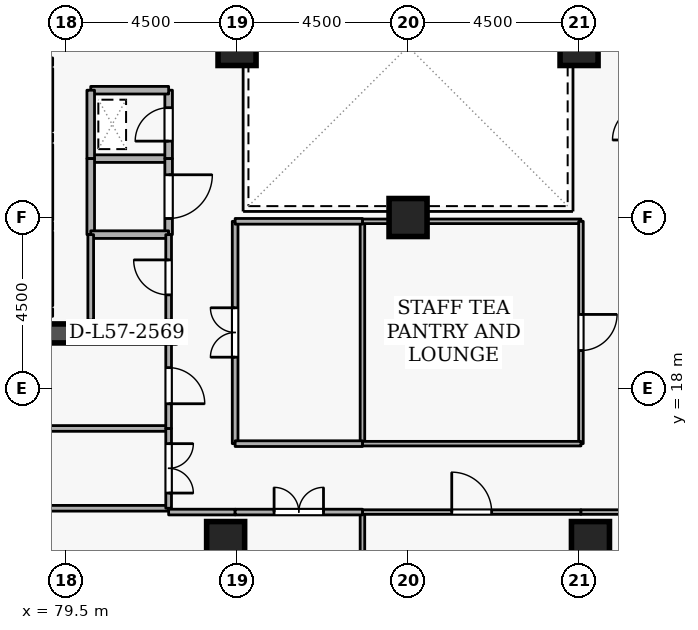
"""IFC4 building model, lengths in metres.
Left out: names, types, materials, properties, quantities, classifications, styles, units other than length and angle.
Written with IfcOpenShell. Run it as: python <this file> out.ifc"""

import sys

from ifc_helpers import new_model, si_unit, direction, frame, frame_2d, origin, origin_2d, place, context, subcontext, project, spatial, rectangle, extrude, element, fill, save


model = new_model("IFC4")
c1 = context("Model", 3, precision=1e-05, world=origin(), true_north=direction((0.0, 1.0)))
c2 = subcontext(c1, "Body", "Model", "MODEL_VIEW")
j1 = project(units=[si_unit("LENGTHUNIT", "METRE"), si_unit("PLANEANGLEUNIT", "RADIAN")], contexts=[c1])
p1 = place(None, origin())
s1 = spatial("IfcSite", under=j1, at=p1, CompositionType="ELEMENT")
p2 = place(p1, origin())
s2 = spatial("IfcBuilding", under=s1, at=p2, CompositionType="ELEMENT")
p3 = place(p2, frame((0.0, 0.0, 214.5)))
s3 = spatial("IfcBuildingStorey", under=s2, at=p3, CompositionType="ELEMENT", Elevation=214.5)
p4 = place(p3, frame((76.6, 19.45, 0.0), z_axis=(0.0, 0.0, 1.0), x_axis=(1.0, 0.0, 0.0)))
e1 = element("IfcWall", 1, at=p4, inside=s3, PredefinedType="SHEAR", context=c2, shape_type="SweptSolid", body=[
    extrude(rectangle(XDim=5.8, YDim=0.5, at=frame_2d((2.9, 0.0))), origin(), (0.0, 0.0, 1.0), 3.6),
])
for number, where, z_axis, x_axis in (
    (2, (93.3, 14.0, 0.0), (0.0, 0.0, 1.0), (1.0, 0.0, 0.0)),
    (3, (83.7, 14.0, 0.0), (0.0, 0.0, 1.0), (1.0, 0.0, 0.0)),
    (4, (93.0, 27.0, 0.0), (0.0, 0.0, 1.0), (1.0, 0.0, 0.0)),
    (5, (84.0, 27.0, 0.0), (0.0, 0.0, 1.0), (1.0, 0.0, 0.0)),
    (6, (88.5, 22.5, 0.0), (0.0, 0.0, 1.0), (1.0, 0.0, 0.0)),
):
    element("IfcColumn", number, at=place(p3, frame(where, z_axis=z_axis, x_axis=x_axis)), inside=s3, PredefinedType="COLUMN", context=c2, shape_type="SweptSolid", body=[
        extrude(rectangle(XDim=1.0, YDim=1.0, at=origin_2d()), origin(), (0.0, 0.0, 1.0), 3.6),
    ])
p5 = place(p3, frame((79.05, 24.78, 0.0), z_axis=(0.0, 0.0, 1.0), x_axis=(0.0, 1.0, 0.0)))
e7 = element("IfcWall", 7, at=p5, inside=s3, PredefinedType="STANDARD", context=c2, shape_type="SweptSolid", body=[
    extrude(rectangle(XDim=1.64, YDim=0.2, at=frame_2d((0.82, 0.0))), origin(), (0.0, 0.0, 1.0), 3.34),
])
p6 = place(p5, frame((0.31, 0.0, 0.0)))
e8 = element("IfcOpeningElement", 8, at=p6, cuts=e7, PredefinedType="OPENING", context=c2, shape_type="SweptSolid", body=[
    extrude(rectangle(XDim=1.02, YDim=2.06, at=frame_2d((0.51, 1.03))), frame((0.0, 0.11, 0.0), z_axis=(0.0, -1.0, 0.0), x_axis=(1.0, 0.0, 0.0)), (0.0, 0.0, 1.0), 0.22),
])
p7 = place(p3, frame((79.05, 22.43, 0.0), z_axis=(0.0, 0.0, 1.0), x_axis=(0.0, 1.0, 0.0)))
e9 = element("IfcWall", 9, at=p7, inside=s3, PredefinedType="STANDARD", context=c2, shape_type="SweptSolid", body=[
    extrude(rectangle(XDim=1.99, YDim=0.2, at=frame_2d((0.995, 0.0))), origin(), (0.0, 0.0, 1.0), 3.34),
])
p8 = place(p7, frame((0.485, 0.0, 0.0)))
e10 = element("IfcOpeningElement", 10, at=p8, cuts=e9, PredefinedType="OPENING", context=c2, shape_type="SweptSolid", body=[
    extrude(rectangle(XDim=1.02, YDim=2.06, at=frame_2d((0.51, 1.03))), frame((0.0, 0.11, 0.0), z_axis=(0.0, -1.0, 0.0), x_axis=(1.0, 0.0, 0.0)), (0.0, 0.0, 1.0), 0.22),
])
p9 = place(p3, frame((79.05, 20.18, 0.0), z_axis=(0.0, 0.0, 1.0), x_axis=(0.0, 1.0, 0.0)))
e11 = element("IfcWall", 11, at=p9, inside=s3, PredefinedType="STANDARD", context=c2, shape_type="SweptSolid", body=[
    extrude(rectangle(XDim=1.94, YDim=0.2, at=frame_2d((0.97, 0.0))), origin(), (0.0, 0.0, 1.0), 3.34),
])
p10 = place(p9, frame((0.46, 0.0, 0.0)))
e12 = element("IfcOpeningElement", 12, at=p10, cuts=e11, PredefinedType="OPENING", context=c2, shape_type="SweptSolid", body=[
    extrude(rectangle(XDim=1.02, YDim=2.06, at=frame_2d((0.51, 1.03))), frame((0.0, 0.11, 0.0), z_axis=(0.0, -1.0, 0.0), x_axis=(1.0, 0.0, 0.0)), (0.0, 0.0, 1.0), 0.22),
])
p11 = place(p3, frame((80.15, 24.05, 0.0), z_axis=(0.0, 0.0, 1.0), x_axis=(1.0, 0.0, 0.0)))
e13 = element("IfcWall", 13, at=p11, inside=s3, PredefinedType="STANDARD", context=c2, shape_type="SweptSolid", body=[
    extrude(rectangle(XDim=2.05, YDim=0.2, at=frame_2d((1.025, 0.0))), origin(), (0.0, 0.0, 1.0), 3.34),
])
p12 = place(p3, frame((82.2, 24.05, 0.0), z_axis=(0.0, 0.0, 1.0), x_axis=(0.0, 1.0, 0.0)))
e14 = element("IfcWall", 14, at=p12, inside=s3, PredefinedType="STANDARD", context=c2, shape_type="SweptSolid", body=[
    extrude(rectangle(XDim=1.8, YDim=0.2, at=frame_2d((0.9, 0.0))), origin(), (0.0, 0.0, 1.0), 3.34),
])
p13 = place(p12, frame((0.46, 0.0, 0.0)))
e15 = element("IfcOpeningElement", 15, at=p13, cuts=e14, PredefinedType="OPENING", context=c2, shape_type="SweptSolid", body=[
    extrude(rectangle(XDim=0.88, YDim=2.04, at=frame_2d((0.44, 1.02))), frame((0.0, 0.11, 0.0), z_axis=(0.0, -1.0, 0.0), x_axis=(1.0, 0.0, 0.0)), (0.0, 0.0, 1.0), 0.22),
])
p14 = place(p3, frame((82.2, 25.85, 0.0), z_axis=(0.0, 0.0, 1.0), x_axis=(-1.0, 0.0, 0.0)))
e16 = element("IfcWall", 16, at=p14, inside=s3, PredefinedType="STANDARD", context=c2, shape_type="SweptSolid", body=[
    extrude(rectangle(XDim=2.05, YDim=0.2, at=frame_2d((1.025, 0.0))), origin(), (0.0, 0.0, 1.0), 3.34),
])
p15 = place(p3, frame((80.15, 25.85, 0.0), z_axis=(0.0, 0.0, 1.0), x_axis=(0.0, -1.0, 0.0)))
e17 = element("IfcWall", 17, at=p15, inside=s3, PredefinedType="STANDARD", context=c2, shape_type="SweptSolid", body=[
    extrude(rectangle(XDim=1.8, YDim=0.2, at=frame_2d((0.9, 0.0))), origin(), (0.0, 0.0, 1.0), 3.34),
])
p16 = place(p3, frame((80.15, 22.05, 0.0), z_axis=(0.0, 0.0, 1.0), x_axis=(0.0, 1.0, 0.0)))
e18 = element("IfcWall", 18, at=p16, inside=s3, PredefinedType="STANDARD", context=c2, shape_type="SweptSolid", body=[
    extrude(rectangle(XDim=2.0, YDim=0.2, at=frame_2d((1.0, 0.0))), origin(), (0.0, 0.0, 1.0), 3.34),
])
p17 = place(p3, frame((82.2, 24.05, 0.0), z_axis=(0.0, 0.0, 1.0), x_axis=(0.0, -1.0, 0.0)))
e19 = element("IfcWall", 19, at=p17, inside=s3, PredefinedType="STANDARD", context=c2, shape_type="SweptSolid", body=[
    extrude(rectangle(XDim=2.0, YDim=0.2, at=frame_2d((1.0, 0.0))), origin(), (0.0, 0.0, 1.0), 3.34),
])
p18 = place(p17, frame((0.425, 0.0, 0.0)))
e20 = element("IfcOpeningElement", 20, at=p18, cuts=e19, PredefinedType="OPENING", context=c2, shape_type="SweptSolid", body=[
    extrude(rectangle(XDim=1.15, YDim=2.1, at=frame_2d((0.575, 1.05))), frame((0.0, 0.11, 0.0), z_axis=(0.0, -1.0, 0.0), x_axis=(1.0, 0.0, 0.0)), (0.0, 0.0, 1.0), 0.22),
])
p19 = place(p3, frame((82.2, 22.05, 0.0), z_axis=(0.0, 0.0, 1.0), x_axis=(-1.0, 0.0, 0.0)))
e21 = element("IfcWall", 21, at=p19, inside=s3, PredefinedType="STANDARD", context=c2, shape_type="SweptSolid", body=[
    extrude(rectangle(XDim=2.05, YDim=0.2, at=frame_2d((1.025, 0.0))), origin(), (0.0, 0.0, 1.0), 3.34),
])
p20 = place(p3, frame((82.2, 19.8, 0.0), z_axis=(0.0, 0.0, 1.0), x_axis=(0.0, 1.0, 0.0)))
e22 = element("IfcWall", 22, at=p20, inside=s3, PredefinedType="PARTITIONING", context=c2, shape_type="SweptSolid", body=[
    extrude(rectangle(XDim=2.25, YDim=0.15, at=frame_2d((1.125, 0.0))), origin(), (0.0, 0.0, 1.0), 3.34),
])
p21 = place(p20, frame((0.665, 0.0, 0.0)))
e23 = element("IfcOpeningElement", 23, at=p21, cuts=e22, PredefinedType="OPENING", context=c2, shape_type="SweptSolid", body=[
    extrude(rectangle(XDim=0.92, YDim=2.08, at=frame_2d((0.46, 1.04))), frame((0.0, 0.085, 0.0), z_axis=(0.0, -1.0, 0.0), x_axis=(1.0, 0.0, 0.0)), (0.0, 0.0, 1.0), 0.17),
])
p22 = place(p3, frame((80.15, 22.05, 0.0), z_axis=(0.0, 0.0, 1.0), x_axis=(0.0, -1.0, 0.0)))
e24 = element("IfcWall", 24, at=p22, inside=s3, PredefinedType="PARTITIONING", context=c2, shape_type="SweptSolid", body=[
    extrude(rectangle(XDim=2.25, YDim=0.15, at=frame_2d((1.125, 0.0))), origin(), (0.0, 0.0, 1.0), 3.34),
])
for number, where, z_axis, x_axis in (
    (25, (82.2, 14.85, 0.0), (0.0, 0.0, 1.0), (-1.0, 0.0, 0.0)),
    (26, (64.78, 16.95, 0.0), (0.0, 0.0, 1.0), (1.0, 0.0, 0.0)),
):
    element("IfcWall", number, at=place(p3, frame(where, z_axis=z_axis, x_axis=x_axis)), inside=s3, PredefinedType="PARTITIONING", context=c2, shape_type="SweptSolid", body=[
        extrude(rectangle(XDim=17.42, YDim=0.15, at=frame_2d((8.71, 0.0))), origin(), (0.0, 0.0, 1.0), 3.34),
    ])
p23 = place(p3, frame((82.2, 16.95, 0.0), z_axis=(0.0, 0.0, 1.0), x_axis=(0.0, -1.0, 0.0)))
e27 = element("IfcWall", 27, at=p23, inside=s3, PredefinedType="PARTITIONING", context=c2, shape_type="SweptSolid", body=[
    extrude(rectangle(XDim=2.1, YDim=0.15, at=frame_2d((1.05, 0.0))), origin(), (0.0, 0.0, 1.0), 3.34),
])
p24 = place(p23, frame((0.4, 0.0, 0.0)))
e28 = element("IfcOpeningElement", 28, at=p24, cuts=e27, PredefinedType="OPENING", context=c2, shape_type="SweptSolid", body=[
    extrude(rectangle(XDim=1.3, YDim=2.12, at=frame_2d((0.65, 1.06))), frame((0.0, 0.085, 0.0), z_axis=(0.0, -1.0, 0.0), x_axis=(1.0, 0.0, 0.0)), (0.0, 0.0, 1.0), 0.17),
])
p25 = place(p3, frame((82.2, 19.2, 0.0), z_axis=(0.0, 0.0, 1.0), x_axis=(0.0, -1.0, 0.0)))
e29 = element("IfcWall", 29, at=p25, inside=s3, PredefinedType="PARTITIONING", context=c2, shape_type="SweptSolid", body=[
    extrude(rectangle(XDim=2.25, YDim=0.15, at=frame_2d((1.125, 0.0))), origin(), (0.0, 0.0, 1.0), 3.34),
])
p26 = place(p25, frame((0.65, 0.0, 0.0)))
e30 = element("IfcOpeningElement", 30, at=p26, cuts=e29, PredefinedType="OPENING", context=c2, shape_type="SweptSolid", body=[
    extrude(rectangle(XDim=0.95, YDim=2.1, at=frame_2d((0.475, 1.05))), frame((0.0, 0.085, 0.0), z_axis=(0.0, -1.0, 0.0), x_axis=(1.0, 0.0, 0.0)), (0.0, 0.0, 1.0), 0.17),
])
p27 = place(p3, frame((87.3, 3.28, 0.0), z_axis=(0.0, 0.0, 1.0), x_axis=(0.0, 1.0, 0.0)))
e31 = element("IfcWall", 31, at=p27, inside=s3, PredefinedType="PARTITIONING", context=c2, shape_type="SweptSolid", body=[
    extrude(rectangle(XDim=11.47, YDim=0.12, at=frame_2d((5.735, 0.0))), origin(), (0.0, 0.0, 1.0), 3.34),
])
p28 = place(p3, frame((87.3, 14.75, 0.0), z_axis=(0.0, 0.0, 1.0), x_axis=(1.0, 0.0, 0.0)))
e32 = element("IfcWall", 32, at=p28, inside=s3, PredefinedType="PARTITIONING", context=c2, shape_type="SweptSolid", body=[
    extrude(rectangle(XDim=5.75, YDim=0.12, at=frame_2d((2.875, 0.0))), origin(), (0.0, 0.0, 1.0), 3.34),
])
p29 = place(p28, frame((2.35, 0.0, 0.0)))
e33 = element("IfcOpeningElement", 33, at=p29, cuts=e32, PredefinedType="OPENING", context=c2, shape_type="SweptSolid", body=[
    extrude(rectangle(XDim=1.05, YDim=2.1, at=frame_2d((0.525, 1.05))), frame((0.0, 0.07, 0.0), z_axis=(0.0, -1.0, 0.0), x_axis=(1.0, 0.0, 0.0)), (0.0, 0.0, 1.0), 0.14),
])
p30 = place(p3, frame((93.05, 14.75, 0.0), z_axis=(0.0, 0.0, 1.0), x_axis=(1.0, 0.0, 0.0)))
e34 = element("IfcWall", 34, at=p30, inside=s3, PredefinedType="PARTITIONING", context=c2, shape_type="SweptSolid", body=[
    extrude(rectangle(XDim=1.75, YDim=0.12, at=frame_2d((0.875, 0.0))), origin(), (0.0, 0.0, 1.0), 3.34),
])
p31 = place(p3, frame((82.2, 14.75, 0.0), z_axis=(0.0, 0.0, 1.0), x_axis=(1.0, 0.0, 0.0)))
e35 = element("IfcWall", 35, at=p31, inside=s3, PredefinedType="PARTITIONING", context=c2, shape_type="SweptSolid", body=[
    extrude(rectangle(XDim=1.75, YDim=0.15, at=frame_2d((0.875, 0.0))), origin(), (0.0, 0.0, 1.0), 3.34),
])
p32 = place(p3, frame((83.95, 14.75, 0.0), z_axis=(0.0, 0.0, 1.0), x_axis=(1.0, 0.0, 0.0)))
e36 = element("IfcWall", 36, at=p32, inside=s3, PredefinedType="PARTITIONING", context=c2, shape_type="SweptSolid", body=[
    extrude(rectangle(XDim=3.35, YDim=0.15, at=frame_2d((1.675, 0.0))), origin(), (0.0, 0.0, 1.0), 3.34),
])
p33 = place(p32, frame((1.025, 0.0, 0.0)))
e37 = element("IfcOpeningElement", 37, at=p33, cuts=e36, PredefinedType="OPENING", context=c2, shape_type="SweptSolid", body=[
    extrude(rectangle(XDim=1.3, YDim=2.12, at=frame_2d((0.65, 1.06))), frame((0.0, 0.085, 0.0), z_axis=(0.0, -1.0, 0.0), x_axis=(1.0, 0.0, 0.0)), (0.0, 0.0, 1.0), 0.17),
])
p34 = place(p3, frame((87.3, 16.55, 0.0), z_axis=(0.0, 0.0, 1.0), x_axis=(0.0, 1.0, 0.0)))
e38 = element("IfcWall", 38, at=p34, inside=s3, PredefinedType="PARTITIONING", context=c2, shape_type="SweptSolid", body=[
    extrude(rectangle(XDim=5.85, YDim=0.12, at=frame_2d((2.925, 0.0))), origin(), (0.0, 0.0, 1.0), 3.34),
])
p35 = place(p3, frame((87.3, 22.4, 0.0), z_axis=(0.0, 0.0, 1.0), x_axis=(1.0, 0.0, 0.0)))
e39 = element("IfcWall", 39, at=p35, inside=s3, PredefinedType="PARTITIONING", context=c2, shape_type="SweptSolid", body=[
    extrude(rectangle(XDim=5.75, YDim=0.12, at=frame_2d((2.875, 0.0))), origin(), (0.0, 0.0, 1.0), 3.34),
])
p36 = place(p3, frame((93.05, 22.4, 0.0), z_axis=(0.0, 0.0, 1.0), x_axis=(0.0, -1.0, 0.0)))
e40 = element("IfcWall", 40, at=p36, inside=s3, PredefinedType="PARTITIONING", context=c2, shape_type="SweptSolid", body=[
    extrude(rectangle(XDim=5.85, YDim=0.12, at=frame_2d((2.925, 0.0))), origin(), (0.0, 0.0, 1.0), 3.34),
])
p37 = place(p36, frame((2.45, 0.0, 0.0)))
e41 = element("IfcOpeningElement", 41, at=p37, cuts=e40, PredefinedType="OPENING", context=c2, shape_type="SweptSolid", body=[
    extrude(rectangle(XDim=0.95, YDim=2.1, at=frame_2d((0.475, 1.05))), frame((0.0, 0.07, 0.0), z_axis=(0.0, -1.0, 0.0), x_axis=(1.0, 0.0, 0.0)), (0.0, 0.0, 1.0), 0.14),
])
p38 = place(p3, frame((93.05, 16.55, 0.0), z_axis=(0.0, 0.0, 1.0), x_axis=(-1.0, 0.0, 0.0)))
e42 = element("IfcWall", 42, at=p38, inside=s3, PredefinedType="PARTITIONING", context=c2, shape_type="SweptSolid", body=[
    extrude(rectangle(XDim=5.75, YDim=0.12, at=frame_2d((2.875, 0.0))), origin(), (0.0, 0.0, 1.0), 3.34),
])
p39 = place(p3, frame((83.95, 16.55, 0.0), z_axis=(0.0, 0.0, 1.0), x_axis=(0.0, 1.0, 0.0)))
e43 = element("IfcWall", 43, at=p39, inside=s3, PredefinedType="PARTITIONING", context=c2, shape_type="SweptSolid", body=[
    extrude(rectangle(XDim=5.85, YDim=0.15, at=frame_2d((2.925, 0.0))), origin(), (0.0, 0.0, 1.0), 3.34),
])
p40 = place(p39, frame((2.275, 0.0, 0.0)))
e44 = element("IfcOpeningElement", 44, at=p40, cuts=e43, PredefinedType="OPENING", context=c2, shape_type="SweptSolid", body=[
    extrude(rectangle(XDim=1.3, YDim=2.12, at=frame_2d((0.65, 1.06))), frame((0.0, 0.085, 0.0), z_axis=(0.0, -1.0, 0.0), x_axis=(1.0, 0.0, 0.0)), (0.0, 0.0, 1.0), 0.17),
])
for number, where, z_axis, x_axis in (
    (45, (83.95, 22.4, 0.0), (0.0, 0.0, 1.0), (1.0, 0.0, 0.0)),
    (46, (87.3, 16.55, 0.0), (0.0, 0.0, 1.0), (-1.0, 0.0, 0.0)),
):
    element("IfcWall", number, at=place(p3, frame(where, z_axis=z_axis, x_axis=x_axis)), inside=s3, PredefinedType="PARTITIONING", context=c2, shape_type="SweptSolid", body=[
        extrude(rectangle(XDim=3.35, YDim=0.15, at=frame_2d((1.675, 0.0))), origin(), (0.0, 0.0, 1.0), 3.34),
    ])
p41 = place(p13, origin())
e47 = element("IfcDoor", 47, at=p41, inside=s3, OperationType="SINGLE_SWING_LEFT", PredefinedType="DOOR", context=c2, shape_type="SweptSolid", body=[
    extrude(rectangle(XDim=0.88, YDim=2.04, at=frame_2d((0.44, 1.02))), frame((0.0, 0.025, 0.0), z_axis=(0.0, -1.0, 0.0), x_axis=(1.0, 0.0, 0.0)), (0.0, 0.0, 1.0), 0.05),
])
fill(e15, e47)
p42 = place(p21, origin())
e48 = element("IfcDoor", 48, at=p42, inside=s3, OperationType="SINGLE_SWING_RIGHT", PredefinedType="DOOR", context=c2, shape_type="SweptSolid", body=[
    extrude(rectangle(XDim=0.92, YDim=2.08, at=frame_2d((0.46, 1.04))), frame((0.0, 0.025, 0.0), z_axis=(0.0, -1.0, 0.0), x_axis=(1.0, 0.0, 0.0)), (0.0, 0.0, 1.0), 0.05),
])
fill(e23, e48)
p43 = place(p18, origin())
e49 = element("IfcDoor", 49, at=p43, inside=s3, OperationType="SINGLE_SWING_LEFT", PredefinedType="DOOR", context=c2, shape_type="SweptSolid", body=[
    extrude(rectangle(XDim=1.15, YDim=2.1, at=frame_2d((0.575, 1.05))), frame((0.0, 0.025, 0.0), z_axis=(0.0, -1.0, 0.0), x_axis=(1.0, 0.0, 0.0)), (0.0, 0.0, 1.0), 0.05),
])
fill(e20, e49)
p44 = place(p24, origin())
e50 = element("IfcDoor", 50, at=p44, inside=s3, OperationType="DOUBLE_DOOR_SINGLE_SWING", PredefinedType="DOOR", context=c2, shape_type="SweptSolid", body=[
    extrude(rectangle(XDim=1.3, YDim=2.12, at=frame_2d((0.65, 1.06))), frame((0.0, 0.025, 0.0), z_axis=(0.0, -1.0, 0.0), x_axis=(1.0, 0.0, 0.0)), (0.0, 0.0, 1.0), 0.05),
])
fill(e28, e50)
p45 = place(p26, origin())
e51 = element("IfcDoor", 51, at=p45, inside=s3, OperationType="SINGLE_SWING_RIGHT", PredefinedType="DOOR", context=c2, shape_type="SweptSolid", body=[
    extrude(rectangle(XDim=0.95, YDim=2.1, at=frame_2d((0.475, 1.05))), frame((0.0, 0.025, 0.0), z_axis=(0.0, -1.0, 0.0), x_axis=(1.0, 0.0, 0.0)), (0.0, 0.0, 1.0), 0.05),
])
fill(e30, e51)
p46 = place(p29, origin())
e52 = element("IfcDoor", 52, at=p46, inside=s3, OperationType="SINGLE_SWING_LEFT", PredefinedType="DOOR", context=c2, shape_type="SweptSolid", body=[
    extrude(rectangle(XDim=1.05, YDim=2.1, at=frame_2d((0.525, 1.05))), frame((0.0, 0.025, 0.0), z_axis=(0.0, -1.0, 0.0), x_axis=(1.0, 0.0, 0.0)), (0.0, 0.0, 1.0), 0.05),
])
fill(e33, e52)
p47 = place(p33, origin())
e53 = element("IfcDoor", 53, at=p47, inside=s3, OperationType="DOUBLE_DOOR_SINGLE_SWING", PredefinedType="DOOR", context=c2, shape_type="SweptSolid", body=[
    extrude(rectangle(XDim=1.3, YDim=2.12, at=frame_2d((0.65, 1.06))), frame((0.0, 0.025, 0.0), z_axis=(0.0, -1.0, 0.0), x_axis=(1.0, 0.0, 0.0)), (0.0, 0.0, 1.0), 0.05),
])
fill(e37, e53)
p48 = place(p37, origin())
e54 = element("IfcDoor", 54, at=p48, inside=s3, OperationType="SINGLE_SWING_LEFT", PredefinedType="DOOR", context=c2, shape_type="SweptSolid", body=[
    extrude(rectangle(XDim=0.95, YDim=2.1, at=frame_2d((0.475, 1.05))), frame((0.0, 0.025, 0.0), z_axis=(0.0, -1.0, 0.0), x_axis=(1.0, 0.0, 0.0)), (0.0, 0.0, 1.0), 0.05),
])
fill(e41, e54)
p49 = place(p40, origin())
e55 = element("IfcDoor", 55, at=p49, inside=s3, OperationType="DOUBLE_DOOR_SINGLE_SWING", PredefinedType="DOOR", context=c2, shape_type="SweptSolid", body=[
    extrude(rectangle(XDim=1.3, YDim=2.12, at=frame_2d((0.65, 1.06))), frame((0.0, 0.025, 0.0), z_axis=(0.0, -1.0, 0.0), x_axis=(1.0, 0.0, 0.0)), (0.0, 0.0, 1.0), 0.05),
])
fill(e44, e55)
save(model, sys.argv[1])
